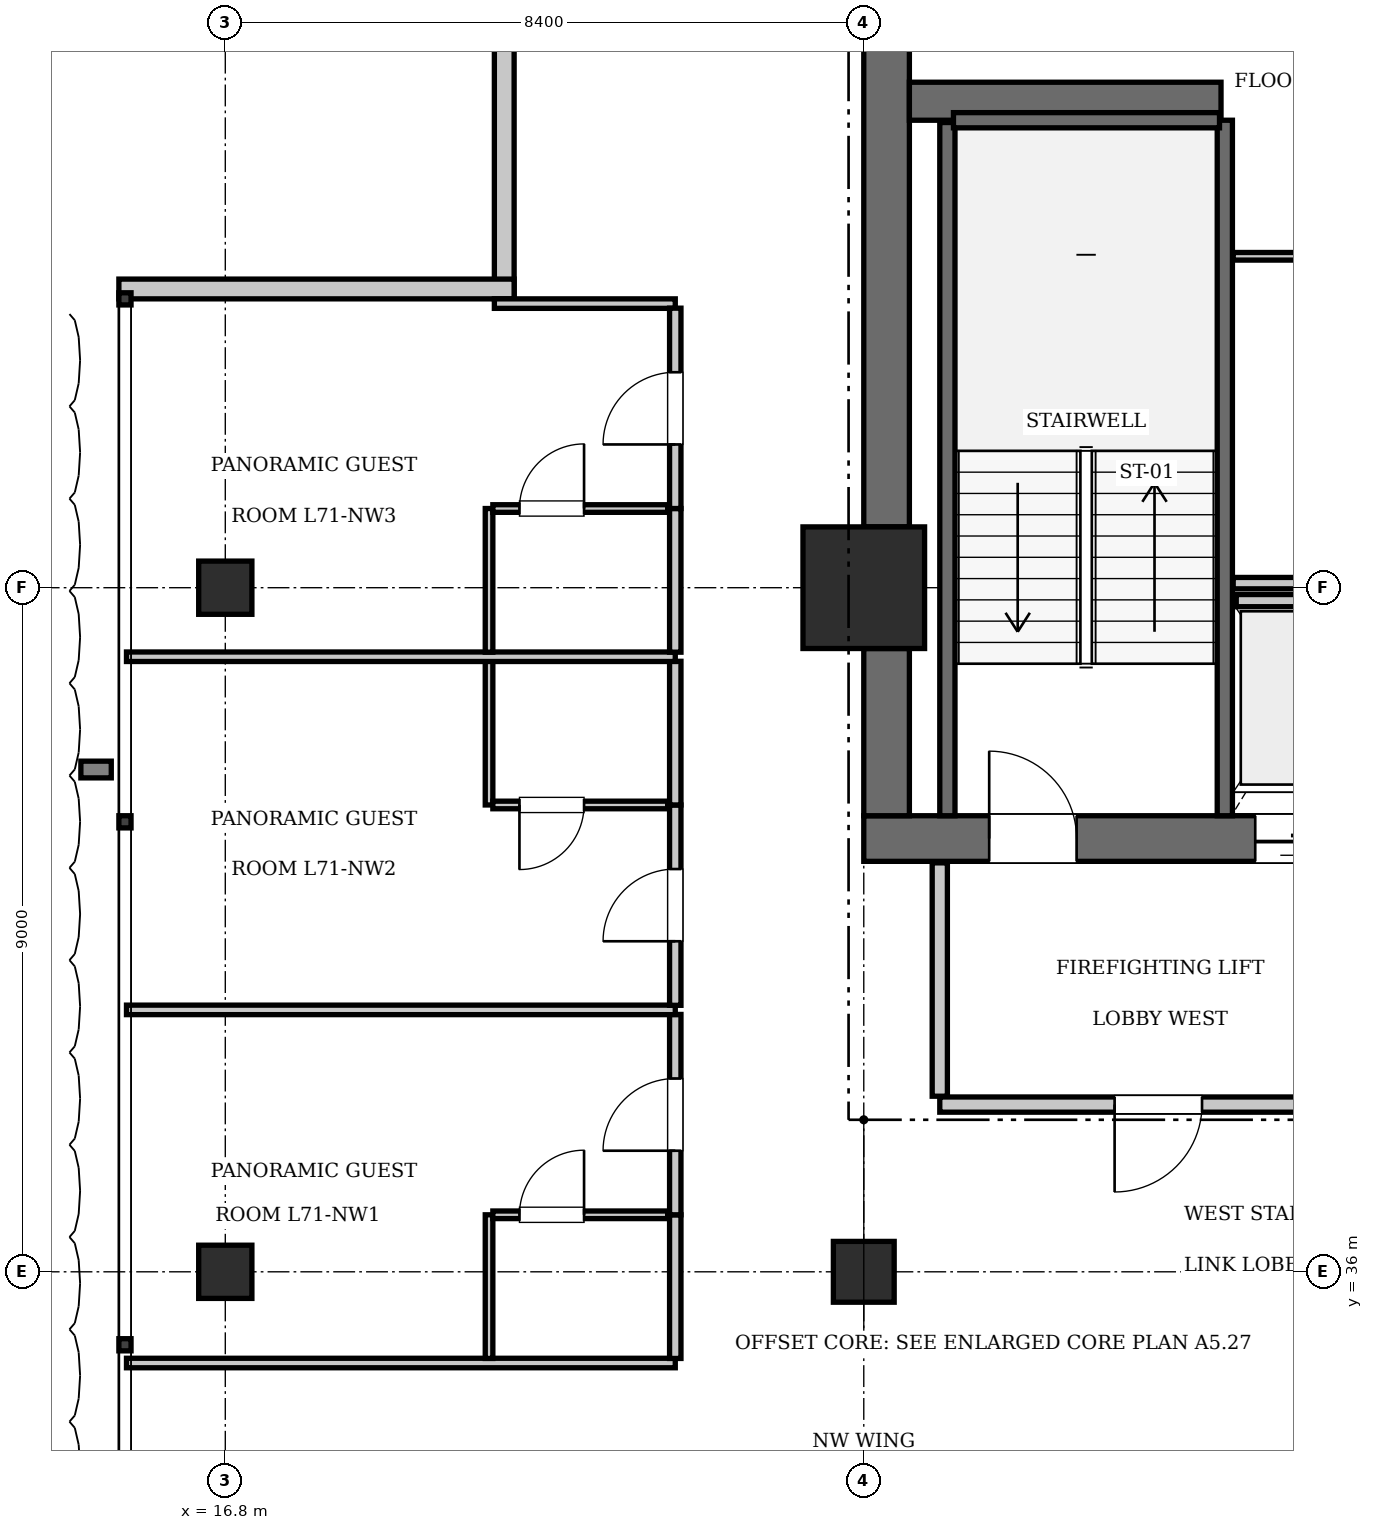
"""IFC4 building model, lengths in metres.
Left out: names, types, materials, properties, quantities, classifications, styles, units other than length and angle.
Written with IfcOpenShell. Run it as: python <this file> out.ifc"""

import sys

from ifc_helpers import new_model, si_unit, direction, frame, frame_2d, origin, origin_2d, place, context, subcontext, project, spatial, rectangle, extrude, element, fill, save


model = new_model("IFC4")
c1 = context("Model", 3, precision=1e-05, world=origin(), true_north=direction((0.0, 1.0)))
c2 = subcontext(c1, "Body", "Model", "MODEL_VIEW")
j1 = project(units=[si_unit("LENGTHUNIT", "METRE"), si_unit("PLANEANGLEUNIT", "RADIAN")], contexts=[c1])
p1 = place(None, origin())
s1 = spatial("IfcSite", under=j1, at=p1, CompositionType="ELEMENT")
p2 = place(p1, origin())
s2 = spatial("IfcBuilding", under=s1, at=p2, CompositionType="ELEMENT")
p3 = place(p2, frame((0.0, 0.0, 289.45)))
s3 = spatial("IfcBuildingStorey", under=s2, at=p3, CompositionType="ELEMENT", Elevation=289.45)
p4 = place(p3, frame((25.2, 45.0, 0.0), z_axis=(0.0, 0.0, 1.0), x_axis=(1.0, 0.0, 0.0)))
e1 = element("IfcColumn", 1, at=p4, inside=s3, PredefinedType="COLUMN", context=c2, shape_type="SweptSolid", body=[
    extrude(rectangle(XDim=1.6, YDim=1.6, at=origin_2d()), origin(), (0.0, 0.0, 1.0), 3.85),
])
p5 = place(p3, frame((25.2, 41.7, 0.0), z_axis=(0.0, 0.0, 1.0), x_axis=(1.0, 0.0, 0.0)))
e2 = element("IfcWall", 2, at=p5, inside=s3, PredefinedType="SHEAR", context=c2, shape_type="SweptSolid", body=[
    extrude(rectangle(XDim=6.8, YDim=0.6, at=frame_2d((3.4, 0.0))), origin(), (0.0, 0.0, 1.0), 3.85),
])
p6 = place(p5, frame((1.65, 0.0, 0.0)))
e3 = element("IfcOpeningElement", 3, at=p6, cuts=e2, PredefinedType="OPENING", context=c2, shape_type="SweptSolid", body=[
    extrude(rectangle(XDim=1.15, YDim=2.15, at=frame_2d((0.575, 1.075))), frame((0.0, 0.31, 0.0), z_axis=(0.0, -1.0, 0.0), x_axis=(1.0, 0.0, 0.0)), (0.0, 0.0, 1.0), 0.62),
])
p7 = place(p5, frame((5.15, 0.0, 0.0)))
e4 = element("IfcOpeningElement", 4, at=p7, cuts=e2, PredefinedType="OPENING", context=c2, shape_type="SweptSolid", body=[
    extrude(rectangle(XDim=1.1, YDim=2.2, at=frame_2d((0.55, 1.1))), frame((0.0, 0.31, 0.0), z_axis=(0.0, -1.0, 0.0), x_axis=(1.0, 0.0, 0.0)), (0.0, 0.0, 1.0), 0.62),
])
p8 = place(p3, frame((25.5, 42.0, 0.0), z_axis=(0.0, 0.0, 1.0), x_axis=(0.0, 1.0, 0.0)))
e5 = element("IfcWall", 5, at=p8, inside=s3, PredefinedType="SHEAR", context=c2, shape_type="SweptSolid", body=[
    extrude(rectangle(XDim=2.2, YDim=0.6, at=frame_2d((1.1, 0.0))), origin(), (0.0, 0.0, 1.0), 3.85),
])
p9 = place(p3, frame((25.5, 45.8, 0.0), z_axis=(0.0, 0.0, 1.0), x_axis=(0.0, 1.0, 0.0)))
e6 = element("IfcWall", 6, at=p9, inside=s3, PredefinedType="SHEAR", context=c2, shape_type="SweptSolid", body=[
    extrude(rectangle(XDim=7.6, YDim=0.6, at=frame_2d((3.8, 0.0))), origin(), (0.0, 0.0, 1.0), 3.85),
])
p10 = place(p3, frame((25.8, 51.4, 0.0), z_axis=(0.0, 0.0, 1.0), x_axis=(1.0, 0.0, 0.0)))
e7 = element("IfcWall", 7, at=p10, inside=s3, PredefinedType="SHEAR", context=c2, shape_type="SweptSolid", body=[
    extrude(rectangle(XDim=4.1, YDim=0.5, at=frame_2d((2.05, 0.0))), origin(), (0.0, 0.0, 1.0), 3.85),
])
p11 = place(p3, frame((25.2, 36.0, 0.0), z_axis=(0.0, 0.0, 1.0), x_axis=(1.0, 0.0, 0.0)))
e8 = element("IfcColumn", 8, at=p11, inside=s3, PredefinedType="COLUMN", context=c2, shape_type="SweptSolid", body=[
    extrude(rectangle(XDim=0.8, YDim=0.8, at=origin_2d()), origin(), (0.0, 0.0, 1.0), 3.85),
])
for number, where, z_axis, x_axis in (
    (9, (16.8, 36.0, 0.0), (0.0, 0.0, 1.0), (1.0, 0.0, 0.0)),
    (10, (16.8, 45.0, 0.0), (0.0, 0.0, 1.0), (1.0, 0.0, 0.0)),
):
    element("IfcColumn", number, at=place(p3, frame(where, z_axis=z_axis, x_axis=x_axis)), inside=s3, PredefinedType="COLUMN", context=c2, shape_type="SweptSolid", body=[
        extrude(rectangle(XDim=0.7, YDim=0.7, at=origin_2d()), origin(), (0.0, 0.0, 1.0), 3.85),
    ])
p12 = place(p3, frame((29.95, 42.0, 0.0), z_axis=(0.0, 0.0, 1.0), x_axis=(0.0, 1.0, 0.0)))
e11 = element("IfcWall", 11, at=p12, inside=s3, PredefinedType="SOLIDWALL", context=c2, shape_type="SweptSolid", body=[
    extrude(rectangle(XDim=9.15, YDim=0.2, at=frame_2d((4.575, 0.0))), origin(), (0.0, 0.0, 1.0), 3.61),
])
p13 = place(p3, frame((26.3, 42.0, 0.0), z_axis=(0.0, 0.0, 1.0), x_axis=(0.0, 1.0, 0.0)))
e12 = element("IfcWall", 12, at=p13, inside=s3, PredefinedType="SOLIDWALL", context=c2, shape_type="SweptSolid", body=[
    extrude(rectangle(XDim=9.12, YDim=0.2, at=frame_2d((4.56, 0.0))), origin(), (0.0, 0.0, 1.0), 3.61),
])
p14 = place(p3, frame((26.38, 51.15, 0.0), z_axis=(0.0, 0.0, 1.0), x_axis=(1.0, 0.0, 0.0)))
e13 = element("IfcWall", 13, at=p14, inside=s3, PredefinedType="SOLIDWALL", context=c2, shape_type="SweptSolid", body=[
    extrude(rectangle(XDim=3.5, YDim=0.2, at=frame_2d((1.75, 0.0))), origin(), (0.0, 0.0, 1.0), 3.61),
])
p15 = place(p3, frame((30.1, 44.83, 0.0), z_axis=(0.0, 0.0, 1.0), x_axis=(1.0, 0.0, 0.0)))
e14 = element("IfcWall", 14, at=p15, inside=s3, PredefinedType="SOLIDWALL", context=c2, shape_type="SweptSolid", body=[
    extrude(rectangle(XDim=1.6, YDim=0.16, at=frame_2d((0.8, 0.0))), origin(), (0.0, 0.0, 1.0), 3.61),
])
p16 = place(p3, frame((20.47, 48.8, 0.0), z_axis=(0.0, 0.0, 1.0), x_axis=(0.0, 1.0, 0.0)))
e15 = element("IfcWall", 15, at=p16, inside=s3, PredefinedType="SOLIDWALL", context=c2, shape_type="SweptSolid", body=[
    extrude(rectangle(XDim=5.2, YDim=0.26, at=frame_2d((2.6, 0.0))), origin(), (0.0, 0.0, 1.0), 3.61),
])
p17 = place(p3, frame((15.4, 48.93, 0.0), z_axis=(0.0, 0.0, 1.0), x_axis=(1.0, 0.0, 0.0)))
e16 = element("IfcWall", 16, at=p17, inside=s3, PredefinedType="SOLIDWALL", context=c2, shape_type="SweptSolid", body=[
    extrude(rectangle(XDim=5.2, YDim=0.26, at=frame_2d((2.6, 0.0))), origin(), (0.0, 0.0, 1.0), 3.61),
])
p18 = place(p3, frame((26.2, 38.2, 0.0), z_axis=(0.0, 0.0, 1.0), x_axis=(1.0, 0.0, 0.0)))
e17 = element("IfcWall", 17, at=p18, inside=s3, PredefinedType="PARTITIONING", context=c2, shape_type="SweptSolid", body=[
    extrude(rectangle(XDim=5.8, YDim=0.2, at=frame_2d((2.9, 0.0))), origin(), (0.0, 0.0, 1.0), 3.61),
])
p19 = place(p18, frame((2.3, 0.0, 0.0)))
e18 = element("IfcOpeningElement", 18, at=p19, cuts=e17, PredefinedType="OPENING", context=c2, shape_type="SweptSolid", body=[
    extrude(rectangle(XDim=1.15, YDim=2.15, at=frame_2d((0.575, 1.075))), frame((0.0, 0.11, 0.0), z_axis=(0.0, -1.0, 0.0), x_axis=(1.0, 0.0, 0.0)), (0.0, 0.0, 1.0), 0.22),
])
p20 = place(p3, frame((26.2, 38.31, 0.0), z_axis=(0.0, 0.0, 1.0), x_axis=(0.0, 1.0, 0.0)))
e19 = element("IfcWall", 19, at=p20, inside=s3, PredefinedType="PARTITIONING", context=c2, shape_type="SweptSolid", body=[
    extrude(rectangle(XDim=3.07, YDim=0.2, at=frame_2d((1.535, 0.0))), origin(), (0.0, 0.0, 1.0), 3.61),
])
p21 = place(p3, frame((30.06, 45.06, 0.0), z_axis=(0.0, 0.0, 1.0), x_axis=(1.0, 0.0, 0.0)))
e20 = element("IfcWall", 20, at=p21, inside=s3, PredefinedType="PARTITIONING", context=c2, shape_type="SweptSolid", body=[
    extrude(rectangle(XDim=3.18, YDim=0.15, at=frame_2d((1.59, 0.0))), origin(), (0.0, 0.0, 1.0), 3.61),
])
p22 = place(p3, frame((30.06, 49.36, 0.0), z_axis=(0.0, 0.0, 1.0), x_axis=(1.0, 0.0, 0.0)))
e21 = element("IfcWall", 21, at=p22, inside=s3, PredefinedType="PARTITIONING", context=c2, shape_type="SweptSolid", body=[
    extrude(rectangle(XDim=3.18, YDim=0.1, at=frame_2d((1.59, 0.0))), origin(), (0.0, 0.0, 1.0), 3.61),
])
p23 = place(p22, frame((1.95, 0.0, 0.0)))
e22 = element("IfcOpeningElement", 22, at=p23, cuts=e21, PredefinedType="OPENING", context=c2, shape_type="SweptSolid", body=[
    extrude(rectangle(XDim=0.8, YDim=2.05, at=frame_2d((0.4, 1.025))), frame((0.0, 0.06, 0.0), z_axis=(0.0, -1.0, 0.0), x_axis=(1.0, 0.0, 0.0)), (0.0, 0.0, 1.0), 0.12),
])
p24 = place(p3, frame((15.5, 34.8, 0.0), z_axis=(0.0, 0.0, 1.0), x_axis=(1.0, 0.0, 0.0)))
e23 = element("IfcWall", 23, at=p24, inside=s3, PredefinedType="PARTITIONING", context=c2, shape_type="SweptSolid", body=[
    extrude(rectangle(XDim=7.22, YDim=0.125, at=frame_2d((3.61, 0.0))), origin(), (0.0, 0.0, 1.0), 3.61),
])
p25 = place(p3, frame((20.34, 48.738, 0.0), z_axis=(0.0, 0.0, 1.0), x_axis=(1.0, 0.0, 0.0)))
e24 = element("IfcWall", 24, at=p25, inside=s3, PredefinedType="PARTITIONING", context=c2, shape_type="SweptSolid", body=[
    extrude(rectangle(XDim=2.38, YDim=0.125, at=frame_2d((1.19, 0.0))), origin(), (0.0, 0.0, 1.0), 3.61),
])
p26 = place(p3, frame((22.72, 34.86, 0.0), z_axis=(0.0, 0.0, 1.0), x_axis=(0.0, 1.0, 0.0)))
e25 = element("IfcWall", 25, at=p26, inside=s3, PredefinedType="PARTITIONING", context=c2, shape_type="SweptSolid", body=[
    extrude(rectangle(XDim=1.89, YDim=0.15, at=frame_2d((0.945, 0.0))), origin(), (0.0, 0.0, 1.0), 3.61),
])
p27 = place(p3, frame((22.72, 36.75, 0.0), z_axis=(0.0, 0.0, 1.0), x_axis=(0.0, 1.0, 0.0)))
e26 = element("IfcWall", 26, at=p27, inside=s3, PredefinedType="PARTITIONING", context=c2, shape_type="SweptSolid", body=[
    extrude(rectangle(XDim=2.636, YDim=0.15, at=frame_2d((1.318, 0.0))), origin(), (0.0, 0.0, 1.0), 3.61),
])
p28 = place(p27, frame((0.843, 0.0, 0.0)))
e27 = element("IfcOpeningElement", 27, at=p28, cuts=e26, PredefinedType="OPENING", context=c2, shape_type="SweptSolid", body=[
    extrude(rectangle(XDim=0.95, YDim=2.15, at=frame_2d((0.475, 1.075))), frame((0.0, 0.085, 0.0), z_axis=(0.0, -1.0, 0.0), x_axis=(1.0, 0.0, 0.0)), (0.0, 0.0, 1.0), 0.17),
])
p29 = place(p3, frame((20.27, 34.86, 0.0), z_axis=(0.0, 0.0, 1.0), x_axis=(0.0, 1.0, 0.0)))
e28 = element("IfcWall", 28, at=p29, inside=s3, PredefinedType="PARTITIONING", context=c2, shape_type="SweptSolid", body=[
    extrude(rectangle(XDim=1.89, YDim=0.1, at=frame_2d((0.945, 0.0))), origin(), (0.0, 0.0, 1.0), 3.61),
])
p30 = place(p3, frame((20.32, 36.75, 0.0), z_axis=(0.0, 0.0, 1.0), x_axis=(1.0, 0.0, 0.0)))
e29 = element("IfcWall", 29, at=p30, inside=s3, PredefinedType="PARTITIONING", context=c2, shape_type="SweptSolid", body=[
    extrude(rectangle(XDim=2.3, YDim=0.1, at=frame_2d((1.15, 0.0))), origin(), (0.0, 0.0, 1.0), 3.61),
])
p31 = place(p30, frame((0.35, 0.0, 0.0)))
e30 = element("IfcOpeningElement", 30, at=p31, cuts=e29, PredefinedType="OPENING", context=c2, shape_type="SweptSolid", body=[
    extrude(rectangle(XDim=0.85, YDim=2.1, at=frame_2d((0.425, 1.05))), frame((0.0, 0.06, 0.0), z_axis=(0.0, -1.0, 0.0), x_axis=(1.0, 0.0, 0.0)), (0.0, 0.0, 1.0), 0.12),
])
p32 = place(p3, frame((15.5, 39.446, 0.0), z_axis=(0.0, 0.0, 1.0), x_axis=(1.0, 0.0, 0.0)))
e31 = element("IfcWall", 31, at=p32, inside=s3, PredefinedType="PARTITIONING", context=c2, shape_type="SweptSolid", body=[
    extrude(rectangle(XDim=7.22, YDim=0.125, at=frame_2d((3.61, 0.0))), origin(), (0.0, 0.0, 1.0), 3.61),
])
p33 = place(p3, frame((22.72, 39.506, 0.0), z_axis=(0.0, 0.0, 1.0), x_axis=(0.0, 1.0, 0.0)))
e32 = element("IfcWall", 32, at=p33, inside=s3, PredefinedType="PARTITIONING", context=c2, shape_type="SweptSolid", body=[
    extrude(rectangle(XDim=2.636, YDim=0.15, at=frame_2d((1.318, 0.0))), origin(), (0.0, 0.0, 1.0), 3.61),
])
p34 = place(p33, frame((0.843, 0.0, 0.0)))
e33 = element("IfcOpeningElement", 33, at=p34, cuts=e32, PredefinedType="OPENING", context=c2, shape_type="SweptSolid", body=[
    extrude(rectangle(XDim=0.95, YDim=2.15, at=frame_2d((0.475, 1.075))), frame((0.0, 0.085, 0.0), z_axis=(0.0, -1.0, 0.0), x_axis=(1.0, 0.0, 0.0)), (0.0, 0.0, 1.0), 0.17),
])
p35 = place(p3, frame((22.72, 42.142, 0.0), z_axis=(0.0, 0.0, 1.0), x_axis=(0.0, 1.0, 0.0)))
e34 = element("IfcWall", 34, at=p35, inside=s3, PredefinedType="PARTITIONING", context=c2, shape_type="SweptSolid", body=[
    extrude(rectangle(XDim=1.89, YDim=0.15, at=frame_2d((0.945, 0.0))), origin(), (0.0, 0.0, 1.0), 3.61),
])
p36 = place(p3, frame((20.27, 42.142, 0.0), z_axis=(0.0, 0.0, 1.0), x_axis=(0.0, 1.0, 0.0)))
e35 = element("IfcWall", 35, at=p36, inside=s3, PredefinedType="PARTITIONING", context=c2, shape_type="SweptSolid", body=[
    extrude(rectangle(XDim=1.89, YDim=0.1, at=frame_2d((0.945, 0.0))), origin(), (0.0, 0.0, 1.0), 3.61),
])
p37 = place(p3, frame((20.32, 42.142, 0.0), z_axis=(0.0, 0.0, 1.0), x_axis=(1.0, 0.0, 0.0)))
e36 = element("IfcWall", 36, at=p37, inside=s3, PredefinedType="PARTITIONING", context=c2, shape_type="SweptSolid", body=[
    extrude(rectangle(XDim=2.3, YDim=0.1, at=frame_2d((1.15, 0.0))), origin(), (0.0, 0.0, 1.0), 3.61),
])
p38 = place(p37, frame((0.35, 0.0, 0.0)))
e37 = element("IfcOpeningElement", 37, at=p38, cuts=e36, PredefinedType="OPENING", context=c2, shape_type="SweptSolid", body=[
    extrude(rectangle(XDim=0.85, YDim=2.1, at=frame_2d((0.425, 1.05))), frame((0.0, 0.06, 0.0), z_axis=(0.0, -1.0, 0.0), x_axis=(1.0, 0.0, 0.0)), (0.0, 0.0, 1.0), 0.12),
])
p39 = place(p3, frame((15.5, 44.092, 0.0), z_axis=(0.0, 0.0, 1.0), x_axis=(1.0, 0.0, 0.0)))
e38 = element("IfcWall", 38, at=p39, inside=s3, PredefinedType="PARTITIONING", context=c2, shape_type="SweptSolid", body=[
    extrude(rectangle(XDim=7.22, YDim=0.125, at=frame_2d((3.61, 0.0))), origin(), (0.0, 0.0, 1.0), 3.61),
])
p40 = place(p3, frame((22.72, 44.152, 0.0), z_axis=(0.0, 0.0, 1.0), x_axis=(0.0, 1.0, 0.0)))
e39 = element("IfcWall", 39, at=p40, inside=s3, PredefinedType="PARTITIONING", context=c2, shape_type="SweptSolid", body=[
    extrude(rectangle(XDim=1.89, YDim=0.15, at=frame_2d((0.945, 0.0))), origin(), (0.0, 0.0, 1.0), 3.61),
])
p41 = place(p3, frame((22.72, 46.042, 0.0), z_axis=(0.0, 0.0, 1.0), x_axis=(0.0, 1.0, 0.0)))
e40 = element("IfcWall", 40, at=p41, inside=s3, PredefinedType="PARTITIONING", context=c2, shape_type="SweptSolid", body=[
    extrude(rectangle(XDim=2.636, YDim=0.15, at=frame_2d((1.318, 0.0))), origin(), (0.0, 0.0, 1.0), 3.61),
])
p42 = place(p41, frame((0.843, 0.0, 0.0)))
e41 = element("IfcOpeningElement", 41, at=p42, cuts=e40, PredefinedType="OPENING", context=c2, shape_type="SweptSolid", body=[
    extrude(rectangle(XDim=0.95, YDim=2.15, at=frame_2d((0.475, 1.075))), frame((0.0, 0.085, 0.0), z_axis=(0.0, -1.0, 0.0), x_axis=(1.0, 0.0, 0.0)), (0.0, 0.0, 1.0), 0.17),
])
p43 = place(p3, frame((20.27, 44.152, 0.0), z_axis=(0.0, 0.0, 1.0), x_axis=(0.0, 1.0, 0.0)))
e42 = element("IfcWall", 42, at=p43, inside=s3, PredefinedType="PARTITIONING", context=c2, shape_type="SweptSolid", body=[
    extrude(rectangle(XDim=1.89, YDim=0.1, at=frame_2d((0.945, 0.0))), origin(), (0.0, 0.0, 1.0), 3.61),
])
p44 = place(p3, frame((20.32, 46.042, 0.0), z_axis=(0.0, 0.0, 1.0), x_axis=(1.0, 0.0, 0.0)))
e43 = element("IfcWall", 43, at=p44, inside=s3, PredefinedType="PARTITIONING", context=c2, shape_type="SweptSolid", body=[
    extrude(rectangle(XDim=2.3, YDim=0.1, at=frame_2d((1.15, 0.0))), origin(), (0.0, 0.0, 1.0), 3.61),
])
p45 = place(p44, frame((0.35, 0.0, 0.0)))
e44 = element("IfcOpeningElement", 44, at=p45, cuts=e43, PredefinedType="OPENING", context=c2, shape_type="SweptSolid", body=[
    extrude(rectangle(XDim=0.85, YDim=2.1, at=frame_2d((0.425, 1.05))), frame((0.0, 0.06, 0.0), z_axis=(0.0, -1.0, 0.0), x_axis=(1.0, 0.0, 0.0)), (0.0, 0.0, 1.0), 0.12),
])
p46 = place(p6, origin())
e45 = element("IfcDoor", 45, at=p46, inside=s3, OperationType="SINGLE_SWING_LEFT", PredefinedType="DOOR", context=c2, shape_type="SweptSolid", body=[
    extrude(rectangle(XDim=1.15, YDim=2.15, at=frame_2d((0.575, 1.075))), frame((0.0, 0.025, 0.0), z_axis=(0.0, -1.0, 0.0), x_axis=(1.0, 0.0, 0.0)), (0.0, 0.0, 1.0), 0.05),
])
fill(e3, e45)
p47 = place(p7, frame((1.1, 0.0, 0.0), z_axis=(0.0, 0.0, 1.0), x_axis=(-1.0, 0.0, 0.0)))
e46 = element("IfcDoor", 46, at=p47, inside=s3, OperationType="SLIDING_TO_LEFT", PredefinedType="DOOR", context=c2, shape_type="SweptSolid", body=[
    extrude(rectangle(XDim=1.1, YDim=2.2, at=frame_2d((0.55, 1.1))), frame((0.0, 0.025, 0.0), z_axis=(0.0, -1.0, 0.0), x_axis=(1.0, 0.0, 0.0)), (0.0, 0.0, 1.0), 0.05),
])
fill(e4, e46)
p48 = place(p19, frame((1.15, 0.0, 0.0), z_axis=(0.0, 0.0, 1.0), x_axis=(-1.0, 0.0, 0.0)))
e47 = element("IfcDoor", 47, at=p48, inside=s3, OperationType="SINGLE_SWING_RIGHT", PredefinedType="DOOR", context=c2, shape_type="SweptSolid", body=[
    extrude(rectangle(XDim=1.15, YDim=2.15, at=frame_2d((0.575, 1.075))), frame((0.0, 0.025, 0.0), z_axis=(0.0, -1.0, 0.0), x_axis=(1.0, 0.0, 0.0)), (0.0, 0.0, 1.0), 0.05),
])
fill(e18, e47)
p49 = place(p31, origin())
e48 = element("IfcDoor", 48, at=p49, inside=s3, OperationType="SINGLE_SWING_RIGHT", PredefinedType="DOOR", context=c2, shape_type="SweptSolid", body=[
    extrude(rectangle(XDim=0.85, YDim=2.1, at=frame_2d((0.425, 1.05))), frame((0.0, 0.025, 0.0), z_axis=(0.0, -1.0, 0.0), x_axis=(1.0, 0.0, 0.0)), (0.0, 0.0, 1.0), 0.05),
])
fill(e30, e48)
p50 = place(p28, origin())
e49 = element("IfcDoor", 49, at=p50, inside=s3, OperationType="SINGLE_SWING_LEFT", PredefinedType="DOOR", context=c2, shape_type="SweptSolid", body=[
    extrude(rectangle(XDim=0.95, YDim=2.15, at=frame_2d((0.475, 1.075))), frame((0.0, 0.025, 0.0), z_axis=(0.0, -1.0, 0.0), x_axis=(1.0, 0.0, 0.0)), (0.0, 0.0, 1.0), 0.05),
])
fill(e27, e49)
p51 = place(p38, frame((0.85, 0.0, 0.0), z_axis=(0.0, 0.0, 1.0), x_axis=(-1.0, 0.0, 0.0)))
e50 = element("IfcDoor", 50, at=p51, inside=s3, OperationType="SINGLE_SWING_RIGHT", PredefinedType="DOOR", context=c2, shape_type="SweptSolid", body=[
    extrude(rectangle(XDim=0.85, YDim=2.1, at=frame_2d((0.425, 1.05))), frame((0.0, 0.025, 0.0), z_axis=(0.0, -1.0, 0.0), x_axis=(1.0, 0.0, 0.0)), (0.0, 0.0, 1.0), 0.05),
])
fill(e37, e50)
p52 = place(p34, origin())
e51 = element("IfcDoor", 51, at=p52, inside=s3, OperationType="SINGLE_SWING_LEFT", PredefinedType="DOOR", context=c2, shape_type="SweptSolid", body=[
    extrude(rectangle(XDim=0.95, YDim=2.15, at=frame_2d((0.475, 1.075))), frame((0.0, 0.025, 0.0), z_axis=(0.0, -1.0, 0.0), x_axis=(1.0, 0.0, 0.0)), (0.0, 0.0, 1.0), 0.05),
])
fill(e33, e51)
p53 = place(p45, origin())
e52 = element("IfcDoor", 52, at=p53, inside=s3, OperationType="SINGLE_SWING_RIGHT", PredefinedType="DOOR", context=c2, shape_type="SweptSolid", body=[
    extrude(rectangle(XDim=0.85, YDim=2.1, at=frame_2d((0.425, 1.05))), frame((0.0, 0.025, 0.0), z_axis=(0.0, -1.0, 0.0), x_axis=(1.0, 0.0, 0.0)), (0.0, 0.0, 1.0), 0.05),
])
fill(e44, e52)
p54 = place(p42, origin())
e53 = element("IfcDoor", 53, at=p54, inside=s3, OperationType="SINGLE_SWING_LEFT", PredefinedType="DOOR", context=c2, shape_type="SweptSolid", body=[
    extrude(rectangle(XDim=0.95, YDim=2.15, at=frame_2d((0.475, 1.075))), frame((0.0, 0.025, 0.0), z_axis=(0.0, -1.0, 0.0), x_axis=(1.0, 0.0, 0.0)), (0.0, 0.0, 1.0), 0.05),
])
fill(e41, e53)
save(model, sys.argv[1])
